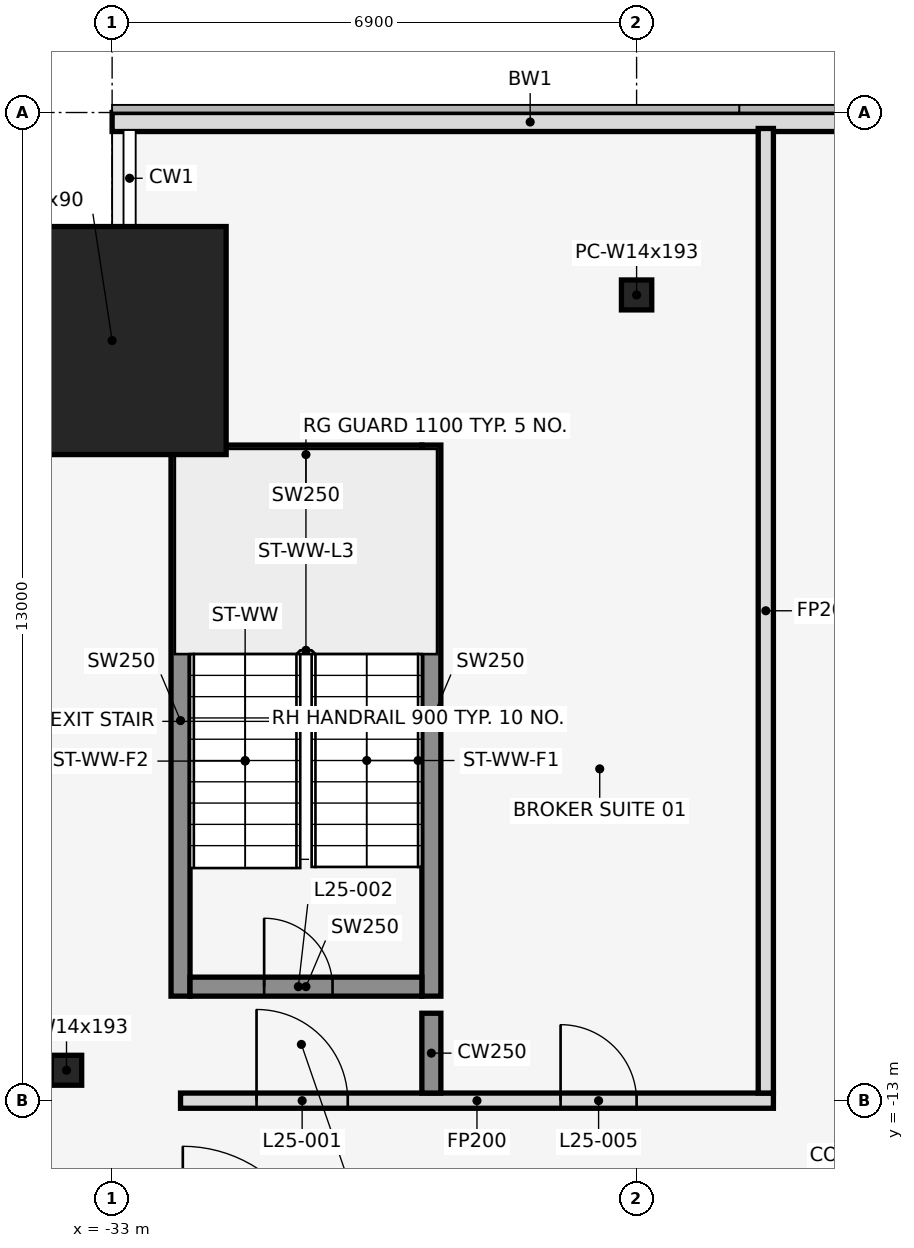
"""IFC4 building model, lengths in metres.
Left out: names, types, materials, properties, quantities, classifications, styles, units other than length and angle.
Written with IfcOpenShell. Run it as: python <this file> out.ifc"""

import sys

from ifc_helpers import new_model, si_unit, direction, frame, frame_2d, origin, origin_2d, place, context, subcontext, project, spatial, rectangle, hollow_rectangle, i_section, extrude, element, fill, save


model = new_model("IFC4")
c1 = context("Model", 3, precision=1e-05, world=origin(), true_north=direction((0.0, 1.0)))
c2 = subcontext(c1, "Body", "Model", "MODEL_VIEW")
j1 = project(units=[si_unit("LENGTHUNIT", "METRE"), si_unit("PLANEANGLEUNIT", "RADIAN")], contexts=[c1])
p1 = place(None, origin())
s1 = spatial("IfcSite", under=j1, at=p1, CompositionType="ELEMENT")
p2 = place(p1, origin())
s2 = spatial("IfcBuilding", under=s1, at=p2, CompositionType="ELEMENT")
p3 = place(p2, frame((0.0, 0.0, 118.6)))
s3 = spatial("IfcBuildingStorey", under=s2, at=p3, CompositionType="ELEMENT", Elevation=118.6)
p4 = place(p3, frame((-33.0, -3.0, 0.0), z_axis=(0.0, 0.0, 1.0), x_axis=(1.0, 0.0, 0.0)))
e1 = element("IfcColumn", 1, at=p4, inside=s3, PredefinedType="COLUMN", context=c2, shape_type="SweptSolid", body=[
    extrude(hollow_rectangle(XDim=3.0, YDim=3.0, WallThickness=0.09, at=origin_2d()), origin(), (0.0, 0.0, 1.0), 4.1),
])
for number, where, z_axis, x_axis in (
    (2, (-26.1, -2.4, 0.0), (0.0, 0.0, 1.0), (1.0, 0.0, 0.0)),
    (3, (-33.6, -12.6, 0.0), (0.0, 0.0, 1.0), (1.0, 0.0, 0.0)),
):
    element("IfcColumn", number, at=place(p3, frame(where, z_axis=z_axis, x_axis=x_axis)), inside=s3, PredefinedType="COLUMN", context=c2, shape_type="SweptSolid", body=[
        extrude(i_section(OverallWidth=0.399, OverallDepth=0.394, WebThickness=0.023, FlangeThickness=0.037, at=origin_2d()), origin(), (0.0, 0.0, 1.0), 4.1),
    ])
p5 = place(p3, frame((-22.0, -0.125, 0.0), z_axis=(0.0, 0.0, 1.0), x_axis=(-1.0, 0.0, 0.0)))
e4 = element("IfcWall", 4, at=p5, inside=s3, PredefinedType="STANDARD", context=c2, shape_type="SweptSolid", body=[
    extrude(rectangle(XDim=11.0, YDim=0.25, at=frame_2d((5.5, 0.0))), origin(), (0.0, 0.0, 1.0), 3.95),
])
for number, where, z_axis, x_axis in (
    (5, (-32.1, -11.625, 0.0), (0.0, 0.0, 1.0), (0.0, 1.0, 0.0)),
    (6, (-28.8, -11.625, 0.0), (0.0, 0.0, 1.0), (0.0, 1.0, 0.0)),
):
    element("IfcWall", number, at=place(p3, frame(where, z_axis=z_axis, x_axis=x_axis)), inside=s3, PredefinedType="SHEAR", context=c2, shape_type="SweptSolid", body=[
        extrude(rectangle(XDim=7.25, YDim=0.25, at=frame_2d((3.625, 0.0))), origin(), (0.0, 0.0, 1.0), 4.1),
    ])
p6 = place(p3, frame((-31.975, -11.5, 0.0), z_axis=(0.0, 0.0, 1.0), x_axis=(1.0, 0.0, 0.0)))
e7 = element("IfcWall", 7, at=p6, inside=s3, PredefinedType="SHEAR", context=c2, shape_type="SweptSolid", body=[
    extrude(rectangle(XDim=3.05, YDim=0.25, at=frame_2d((1.525, 0.0))), origin(), (0.0, 0.0, 1.0), 4.1),
])
p7 = place(p6, frame((0.975, 0.0, 0.0)))
e8 = element("IfcOpeningElement", 8, at=p7, cuts=e7, PredefinedType="OPENING", context=c2, shape_type="SweptSolid", body=[
    extrude(rectangle(XDim=0.9, YDim=2.1, at=frame_2d((0.45, 1.05))), frame((0.0, 0.137, 0.0), z_axis=(0.0, -1.0, 0.0), x_axis=(1.0, 0.0, 0.0)), (0.0, 0.0, 1.0), 0.274),
])
p8 = place(p3, frame((-31.975, -4.5, 0.0), z_axis=(0.0, 0.0, 1.0), x_axis=(1.0, 0.0, 0.0)))
e9 = element("IfcWall", 9, at=p8, inside=s3, PredefinedType="SHEAR", context=c2, shape_type="SweptSolid", body=[
    extrude(rectangle(XDim=3.05, YDim=0.25, at=frame_2d((1.525, 0.0))), origin(), (0.0, 0.0, 1.0), 4.1),
])
p9 = place(p3, frame((-32.1, -13.0, 0.0), z_axis=(0.0, 0.0, 1.0), x_axis=(1.0, 0.0, 0.0)))
e10 = element("IfcWall", 10, at=p9, inside=s3, PredefinedType="PARTITIONING", context=c2, shape_type="SweptSolid", body=[
    extrude(rectangle(XDim=7.8, YDim=0.2, at=frame_2d((3.9, 0.0))), origin(), (0.0, 0.0, 1.0), 3.018),
])
p10 = place(p9, frame((1.0, 0.0, 0.0)))
e11 = element("IfcOpeningElement", 11, at=p10, cuts=e10, PredefinedType="OPENING", context=c2, shape_type="SweptSolid", body=[
    extrude(rectangle(XDim=1.2, YDim=2.1, at=frame_2d((0.6, 1.05))), frame((0.0, 0.112, 0.0), z_axis=(0.0, -1.0, 0.0), x_axis=(1.0, 0.0, 0.0)), (0.0, 0.0, 1.0), 0.224),
])
p11 = place(p9, frame((5.0, 0.0, 0.0)))
e12 = element("IfcOpeningElement", 12, at=p11, cuts=e10, PredefinedType="OPENING", context=c2, shape_type="SweptSolid", body=[
    extrude(rectangle(XDim=1.0, YDim=2.1, at=frame_2d((0.5, 1.05))), frame((0.0, 0.112, 0.0), z_axis=(0.0, -1.0, 0.0), x_axis=(1.0, 0.0, 0.0)), (0.0, 0.0, 1.0), 0.224),
])
p12 = place(p3, frame((-28.8, -12.9, 0.0), z_axis=(0.0, 0.0, 1.0), x_axis=(0.0, 1.0, 0.0)))
e13 = element("IfcWall", 13, at=p12, inside=s3, PredefinedType="SHEAR", context=c2, shape_type="SweptSolid", body=[
    extrude(rectangle(XDim=1.05, YDim=0.25, at=frame_2d((0.525, 0.0))), origin(), (0.0, 0.0, 1.0), 4.1),
])
p13 = place(p3, frame((-24.4, -12.9, 0.0), z_axis=(0.0, 0.0, 1.0), x_axis=(0.0, 1.0, 0.0)))
e14 = element("IfcWall", 14, at=p13, inside=s3, PredefinedType="PARTITIONING", context=c2, shape_type="SweptSolid", body=[
    extrude(rectangle(XDim=12.69, YDim=0.2, at=frame_2d((6.345, 0.0))), origin(), (0.0, 0.0, 1.0), 3.018),
])
p14 = place(p10, origin())
e15 = element("IfcDoor", 15, at=p14, inside=s3, OperationType="SINGLE_SWING_LEFT", PredefinedType="DOOR", context=c2, shape_type="SweptSolid", body=[
    extrude(rectangle(XDim=1.2, YDim=2.1, at=frame_2d((0.6, 1.05))), frame((0.0, 0.025, 0.0), z_axis=(0.0, -1.0, 0.0), x_axis=(1.0, 0.0, 0.0)), (0.0, 0.0, 1.0), 0.05),
])
fill(e11, e15)
p15 = place(p7, origin())
e16 = element("IfcDoor", 16, at=p15, inside=s3, OperationType="SINGLE_SWING_LEFT", PredefinedType="DOOR", context=c2, shape_type="SweptSolid", body=[
    extrude(rectangle(XDim=0.9, YDim=2.1, at=frame_2d((0.45, 1.05))), frame((0.0, 0.025, 0.0), z_axis=(0.0, -1.0, 0.0), x_axis=(1.0, 0.0, 0.0)), (0.0, 0.0, 1.0), 0.05),
])
fill(e8, e16)
p16 = place(p11, origin())
e17 = element("IfcDoor", 17, at=p16, inside=s3, OperationType="SINGLE_SWING_LEFT", PredefinedType="DOOR", context=c2, shape_type="SweptSolid", body=[
    extrude(rectangle(XDim=1.0, YDim=2.1, at=frame_2d((0.5, 1.05))), frame((0.0, 0.025, 0.0), z_axis=(0.0, -1.0, 0.0), x_axis=(1.0, 0.0, 0.0)), (0.0, 0.0, 1.0), 0.05),
])
fill(e12, e17)
save(model, sys.argv[1])
